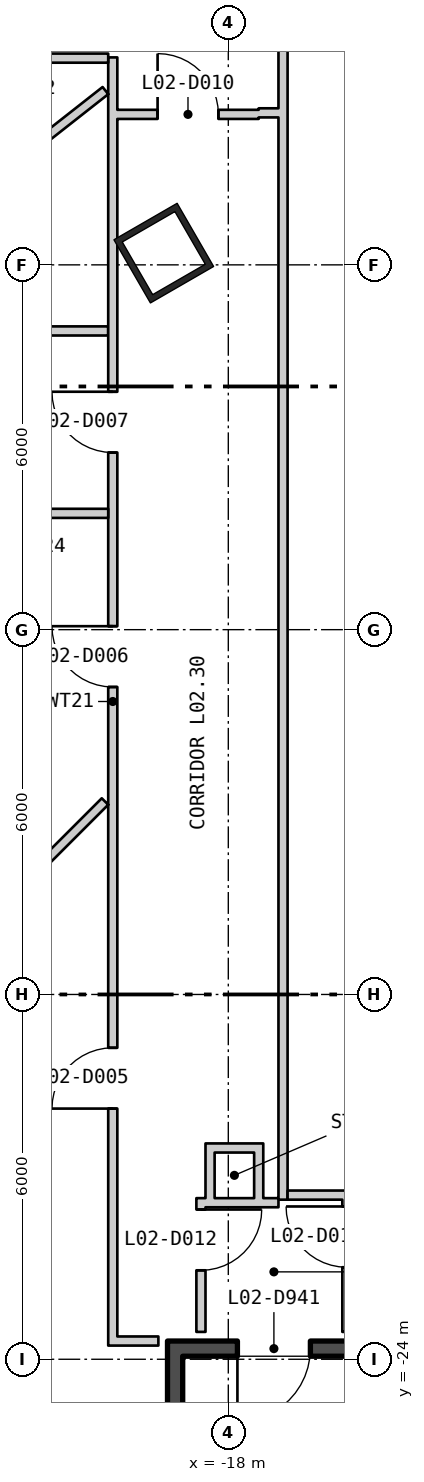
"""IFC4 building model, lengths in metres.
Left out: names, types, materials, properties, quantities, classifications, styles, units other than length and angle.
Written with IfcOpenShell. Run it as: python <this file> out.ifc"""

import sys

from ifc_helpers import new_model, si_unit, direction, frame, frame_2d, origin, origin_2d, place, context, subcontext, project, spatial, rectangle, hollow_rectangle, extrude, element, fill, save


model = new_model("IFC4")
c1 = context("Model", 3, precision=1e-05, world=origin(), true_north=direction((0.0, 1.0)))
c2 = subcontext(c1, "Body", "Model", "MODEL_VIEW")
j1 = project(units=[si_unit("LENGTHUNIT", "METRE"), si_unit("PLANEANGLEUNIT", "RADIAN")], contexts=[c1])
p1 = place(None, origin())
s1 = spatial("IfcSite", under=j1, at=p1, CompositionType="ELEMENT")
p2 = place(p1, origin())
s2 = spatial("IfcBuilding", under=s1, at=p2, CompositionType="ELEMENT")
p3 = place(p2, frame((0.0, 0.0, 13.5)))
s3 = spatial("IfcBuildingStorey", under=s2, at=p3, CompositionType="ELEMENT", Elevation=13.5)
p4 = place(p3, frame((-19.061, -5.807, 0.0), z_axis=(0.0, 0.0, 1.0), x_axis=(0.5, -0.866025403784, 0.0)))
e1 = element("IfcColumn", 1, at=p4, inside=s3, PredefinedType="COLUMN", context=c2, shape_type="SweptSolid", body=[
    extrude(hollow_rectangle(XDim=1.2, YDim=1.2, WallThickness=0.1, at=origin_2d()), origin(), (0.0, 0.0, 1.0), 5.1),
])
p5 = place(p3, frame((-18.875, -31.25, 0.0), z_axis=(0.0, 0.0, 1.0), x_axis=(0.0, 1.0, 0.0)))
e2 = element("IfcWall", 2, at=p5, inside=s3, PredefinedType="SHEAR", context=c2, shape_type="SweptSolid", body=[
    extrude(rectangle(XDim=7.3, YDim=0.25, at=frame_2d((3.65, 0.0))), origin(), (0.0, 0.0, 1.0), 4.88),
])
p6 = place(p3, frame((-19.0, -23.825, 0.0), z_axis=(0.0, 0.0, 1.0), x_axis=(1.0, 0.0, 0.0)))
e3 = element("IfcWall", 3, at=p6, inside=s3, PredefinedType="SHEAR", context=c2, shape_type="SweptSolid", body=[
    extrude(rectangle(XDim=3.5, YDim=0.25, at=frame_2d((1.75, 0.0))), origin(), (0.0, 0.0, 1.0), 4.88),
])
p7 = place(p6, frame((1.15, 0.0, 0.0)))
e4 = element("IfcOpeningElement", 4, at=p7, cuts=e3, PredefinedType="OPENING", context=c2, shape_type="SweptSolid", body=[
    extrude(rectangle(XDim=1.2, YDim=2.1, at=frame_2d((0.6, 1.05))), frame((0.0, 0.135, 0.0), z_axis=(0.0, -1.0, 0.0), x_axis=(1.0, 0.0, 0.0)), (0.0, 0.0, 1.0), 0.27),
])
p8 = place(p3, frame((-26.75, -2.6, 0.0), z_axis=(0.0, 0.0, 1.0), x_axis=(1.0, 0.0, 0.0)))
e5 = element("IfcWall", 5, at=p8, inside=s3, PredefinedType="PARTITIONING", context=c2, shape_type="SweptSolid", body=[
    extrude(rectangle(XDim=6.775, YDim=0.15, at=frame_2d((3.388, 0.0))), origin(), (0.0, 0.0, 1.0), 4.88),
])
p9 = place(p8, frame((1.616, 0.0, 0.0)))
e6 = element("IfcOpeningElement", 6, at=p9, cuts=e5, PredefinedType="OPENING", context=c2, shape_type="SweptSolid", body=[
    extrude(rectangle(XDim=1.0, YDim=2.1, at=frame_2d((0.5, 1.05))), frame((0.0, 0.085, 0.0), z_axis=(0.0, -1.0, 0.0), x_axis=(1.0, 0.0, 0.0)), (0.0, 0.0, 1.0), 0.17),
])
p10 = place(p8, frame((4.658, 0.0, 0.0)))
e7 = element("IfcOpeningElement", 7, at=p10, cuts=e5, PredefinedType="OPENING", context=c2, shape_type="SweptSolid", body=[
    extrude(rectangle(XDim=1.0, YDim=2.1, at=frame_2d((0.5, 1.05))), frame((0.0, 0.085, 0.0), z_axis=(0.0, -1.0, 0.0), x_axis=(1.0, 0.0, 0.0)), (0.0, 0.0, 1.0), 0.17),
])
p11 = place(p3, frame((-25.027, -19.825, 0.0), z_axis=(0.0, 0.0, 1.0), x_axis=(0.707106781187, 0.707106781187, 0.0)))
e8 = element("IfcWall", 8, at=p11, inside=s3, PredefinedType="PARTITIONING", context=c2, shape_type="SweptSolid", body=[
    extrude(rectangle(XDim=7.07, YDim=0.15, at=frame_2d((3.535, 0.0))), origin(), (0.0, 0.0, 1.0), 4.88),
])
p12 = place(p3, frame((-24.745, -6.846, 0.0), z_axis=(0.0, 0.0, 1.0), x_axis=(0.786295235231, 0.617850955372, 0.0)))
e9 = element("IfcWall", 9, at=p12, inside=s3, PredefinedType="PARTITIONING", context=c2, shape_type="SweptSolid", body=[
    extrude(rectangle(XDim=6.008, YDim=0.15, at=frame_2d((3.004, 0.0))), origin(), (0.0, 0.0, 1.0), 4.88),
])
for number, where, z_axis, x_axis in (
    (10, (-22.825, -10.087, 0.0), (0.0, 0.0, 1.0), (1.0, 0.0, 0.0)),
    (11, (-22.825, -7.087, 0.0), (0.0, 0.0, 1.0), (1.0, 0.0, 0.0)),
):
    element("IfcWall", number, at=place(p3, frame(where, z_axis=z_axis, x_axis=x_axis)), inside=s3, PredefinedType="PARTITIONING", context=c2, shape_type="SweptSolid", body=[
        extrude(rectangle(XDim=2.85, YDim=0.15, at=frame_2d((1.425, 0.0))), origin(), (0.0, 0.0, 1.0), 4.88),
    ])
p13 = place(p3, frame((-19.9, -23.775, 0.0), z_axis=(0.0, 0.0, 1.0), x_axis=(0.0, 1.0, 0.0)))
e12 = element("IfcWall", 12, at=p13, inside=s3, PredefinedType="PARTITIONING", context=c2, shape_type="SweptSolid", body=[
    extrude(rectangle(XDim=21.187, YDim=0.15, at=frame_2d((10.594, 0.0))), origin(), (0.0, 0.0, 1.0), 4.88),
])
p14 = place(p13, frame((3.898, 0.0, 0.0)))
e13 = element("IfcOpeningElement", 13, at=p14, cuts=e12, PredefinedType="OPENING", context=c2, shape_type="SweptSolid", body=[
    extrude(rectangle(XDim=1.0, YDim=2.1, at=frame_2d((0.5, 1.05))), frame((0.0, 0.085, 0.0), z_axis=(0.0, -1.0, 0.0), x_axis=(1.0, 0.0, 0.0)), (0.0, 0.0, 1.0), 0.17),
])
p15 = place(p13, frame((10.832, 0.0, 0.0)))
e14 = element("IfcOpeningElement", 14, at=p15, cuts=e12, PredefinedType="OPENING", context=c2, shape_type="SweptSolid", body=[
    extrude(rectangle(XDim=1.0, YDim=2.1, at=frame_2d((0.5, 1.05))), frame((0.0, 0.085, 0.0), z_axis=(0.0, -1.0, 0.0), x_axis=(1.0, 0.0, 0.0)), (0.0, 0.0, 1.0), 0.17),
])
p16 = place(p13, frame((14.688, 0.0, 0.0)))
e15 = element("IfcOpeningElement", 15, at=p16, cuts=e12, PredefinedType="OPENING", context=c2, shape_type="SweptSolid", body=[
    extrude(rectangle(XDim=1.0, YDim=2.1, at=frame_2d((0.5, 1.05))), frame((0.0, 0.085, 0.0), z_axis=(0.0, -1.0, 0.0), x_axis=(1.0, 0.0, 0.0)), (0.0, 0.0, 1.0), 0.17),
])
p17 = place(p3, frame((-19.825, -23.7, 0.0), z_axis=(0.0, 0.0, 1.0), x_axis=(1.0, 0.0, 0.0)))
e16 = element("IfcWall", 16, at=p17, inside=s3, PredefinedType="PARTITIONING", context=c2, shape_type="SweptSolid", body=[
    extrude(rectangle(XDim=0.675, YDim=0.15, at=frame_2d((0.338, 0.0))), origin(), (0.0, 0.0, 1.0), 4.88),
])
p18 = place(p3, frame((-19.825, -3.525, 0.0), z_axis=(0.0, 0.0, 1.0), x_axis=(1.0, 0.0, 0.0)))
e17 = element("IfcWall", 17, at=p18, inside=s3, PredefinedType="PARTITIONING", context=c2, shape_type="SweptSolid", body=[
    extrude(rectangle(XDim=2.325, YDim=0.15, at=frame_2d((1.163, 0.0))), origin(), (0.0, 0.0, 1.0), 4.88),
])
p19 = place(p18, frame((0.662, 0.0, 0.0)))
e18 = element("IfcOpeningElement", 18, at=p19, cuts=e17, PredefinedType="OPENING", context=c2, shape_type="SweptSolid", body=[
    extrude(rectangle(XDim=1.0, YDim=2.1, at=frame_2d((0.5, 1.05))), frame((0.0, 0.085, 0.0), z_axis=(0.0, -1.0, 0.0), x_axis=(1.0, 0.0, 0.0)), (0.0, 0.0, 1.0), 0.17),
])
p20 = place(p3, frame((-18.45, -23.55, 0.0), z_axis=(0.0, 0.0, 1.0), x_axis=(0.0, 1.0, 0.0)))
e19 = element("IfcWall", 19, at=p20, inside=s3, PredefinedType="PARTITIONING", context=c2, shape_type="SweptSolid", body=[
    extrude(rectangle(XDim=2.2, YDim=0.15, at=frame_2d((1.1, 0.0))), origin(), (0.0, 0.0, 1.0), 4.88),
])
p21 = place(p20, frame((1.013, 0.0, 0.0)))
e20 = element("IfcOpeningElement", 20, at=p21, cuts=e19, PredefinedType="OPENING", context=c2, shape_type="SweptSolid", body=[
    extrude(rectangle(XDim=1.0, YDim=2.1, at=frame_2d((0.5, 1.05))), frame((0.0, 0.085, 0.0), z_axis=(0.0, -1.0, 0.0), x_axis=(1.0, 0.0, 0.0)), (0.0, 0.0, 1.0), 0.17),
])
p22 = place(p3, frame((-18.3, -21.5, 0.0), z_axis=(0.0, 0.0, 1.0), x_axis=(0.0, 1.0, 0.0)))
e21 = element("IfcWall", 21, at=p22, inside=s3, PredefinedType="PARTITIONING", context=c2, shape_type="SweptSolid", body=[
    extrude(rectangle(XDim=1.05, YDim=0.15, at=frame_2d((0.525, 0.0))), origin(), (0.0, 0.0, 1.0), 4.88),
])
for number, where, z_axis, x_axis in (
    (22, (-18.225, -21.425, 0.0), (0.0, 0.0, 1.0), (1.0, 0.0, 0.0)),
    (23, (-18.225, -20.525, 0.0), (0.0, 0.0, 1.0), (1.0, 0.0, 0.0)),
):
    element("IfcWall", number, at=place(p3, frame(where, z_axis=z_axis, x_axis=x_axis)), inside=s3, PredefinedType="PARTITIONING", context=c2, shape_type="SweptSolid", body=[
        extrude(rectangle(XDim=0.65, YDim=0.15, at=frame_2d((0.325, 0.0))), origin(), (0.0, 0.0, 1.0), 4.88),
    ])
p23 = place(p3, frame((-17.5, -21.5, 0.0), z_axis=(0.0, 0.0, 1.0), x_axis=(0.0, 1.0, 0.0)))
e24 = element("IfcWall", 24, at=p23, inside=s3, PredefinedType="PARTITIONING", context=c2, shape_type="SweptSolid", body=[
    extrude(rectangle(XDim=1.05, YDim=0.15, at=frame_2d((0.525, 0.0))), origin(), (0.0, 0.0, 1.0), 4.88),
])
p24 = place(p3, frame((-17.5, -3.5, 0.0), z_axis=(0.0, 0.0, 1.0), x_axis=(1.0, 0.0, 0.0)))
e25 = element("IfcWall", 25, at=p24, inside=s3, PredefinedType="PARTITIONING", context=c2, shape_type="SweptSolid", body=[
    extrude(rectangle(XDim=0.325, YDim=0.15, at=frame_2d((0.163, 0.0))), origin(), (0.0, 0.0, 1.0), 4.88),
])
p25 = place(p3, frame((-17.425, -21.425, 0.0), z_axis=(0.0, 0.0, 1.0), x_axis=(1.0, 0.0, 0.0)))
e26 = element("IfcWall", 26, at=p25, inside=s3, PredefinedType="PARTITIONING", context=c2, shape_type="SweptSolid", body=[
    extrude(rectangle(XDim=0.25, YDim=0.15, at=frame_2d((0.125, 0.0))), origin(), (0.0, 0.0, 1.0), 4.88),
])
p26 = place(p3, frame((-17.1, -21.375, 0.0), z_axis=(0.0, 0.0, 1.0), x_axis=(0.0, 1.0, 0.0)))
e27 = element("IfcWall", 27, at=p26, inside=s3, PredefinedType="PARTITIONING", context=c2, shape_type="SweptSolid", body=[
    extrude(rectangle(XDim=19.05, YDim=0.15, at=frame_2d((9.525, 0.0))), origin(), (0.0, 0.0, 1.0), 4.88),
])
p27 = place(p3, frame((-17.025, -21.3, 0.0), z_axis=(0.0, 0.0, 1.0), x_axis=(1.0, 0.0, 0.0)))
e28 = element("IfcWall", 28, at=p27, inside=s3, PredefinedType="PARTITIONING", context=c2, shape_type="SweptSolid", body=[
    extrude(rectangle(XDim=10.654, YDim=0.15, at=frame_2d((5.327, 0.0))), origin(), (0.0, 0.0, 1.0), 4.88),
])
p28 = place(p3, frame((-16.05, -23.55, 0.0), z_axis=(0.0, 0.0, 1.0), x_axis=(0.0, 1.0, 0.0)))
e29 = element("IfcWall", 29, at=p28, inside=s3, PredefinedType="PARTITIONING", context=c2, shape_type="SweptSolid", body=[
    extrude(rectangle(XDim=2.175, YDim=0.15, at=frame_2d((1.087, 0.0))), origin(), (0.0, 0.0, 1.0), 4.88),
])
p29 = place(p28, frame((1.063, 0.0, 0.0)))
e30 = element("IfcOpeningElement", 30, at=p29, cuts=e29, PredefinedType="OPENING", context=c2, shape_type="SweptSolid", body=[
    extrude(rectangle(XDim=1.0, YDim=2.1, at=frame_2d((0.5, 1.05))), frame((0.0, 0.085, 0.0), z_axis=(0.0, -1.0, 0.0), x_axis=(1.0, 0.0, 0.0)), (0.0, 0.0, 1.0), 0.17),
])
p30 = place(p7, origin())
e31 = element("IfcDoor", 31, at=p30, inside=s3, OperationType="SINGLE_SWING_LEFT", PredefinedType="DOOR", context=c2, shape_type="SweptSolid", body=[
    extrude(rectangle(XDim=1.2, YDim=2.1, at=frame_2d((0.6, 1.05))), frame((0.0, 0.025, 0.0), z_axis=(0.0, -1.0, 0.0), x_axis=(1.0, 0.0, 0.0)), (0.0, 0.0, 1.0), 0.05),
])
fill(e4, e31)
p31 = place(p14, origin())
e32 = element("IfcDoor", 32, at=p31, inside=s3, OperationType="SINGLE_SWING_RIGHT", PredefinedType="DOOR", context=c2, shape_type="SweptSolid", body=[
    extrude(rectangle(XDim=1.0, YDim=2.1, at=frame_2d((0.5, 1.05))), frame((0.0, 0.025, 0.0), z_axis=(0.0, -1.0, 0.0), x_axis=(1.0, 0.0, 0.0)), (0.0, 0.0, 1.0), 0.05),
])
fill(e13, e32)
p32 = place(p15, origin())
e33 = element("IfcDoor", 33, at=p32, inside=s3, OperationType="SINGLE_SWING_LEFT", PredefinedType="DOOR", context=c2, shape_type="SweptSolid", body=[
    extrude(rectangle(XDim=1.0, YDim=2.1, at=frame_2d((0.5, 1.05))), frame((0.0, 0.025, 0.0), z_axis=(0.0, -1.0, 0.0), x_axis=(1.0, 0.0, 0.0)), (0.0, 0.0, 1.0), 0.05),
])
fill(e14, e33)
p33 = place(p16, origin())
e34 = element("IfcDoor", 34, at=p33, inside=s3, OperationType="SINGLE_SWING_LEFT", PredefinedType="DOOR", context=c2, shape_type="SweptSolid", body=[
    extrude(rectangle(XDim=1.0, YDim=2.1, at=frame_2d((0.5, 1.05))), frame((0.0, 0.025, 0.0), z_axis=(0.0, -1.0, 0.0), x_axis=(1.0, 0.0, 0.0)), (0.0, 0.0, 1.0), 0.05),
])
fill(e15, e34)
p34 = place(p19, origin())
e35 = element("IfcDoor", 35, at=p34, inside=s3, OperationType="SINGLE_SWING_RIGHT", PredefinedType="DOOR", context=c2, shape_type="SweptSolid", body=[
    extrude(rectangle(XDim=1.0, YDim=2.1, at=frame_2d((0.5, 1.05))), frame((0.0, 0.025, 0.0), z_axis=(0.0, -1.0, 0.0), x_axis=(1.0, 0.0, 0.0)), (0.0, 0.0, 1.0), 0.05),
])
fill(e18, e35)
p35 = place(p21, origin())
e36 = element("IfcDoor", 36, at=p35, inside=s3, OperationType="SINGLE_SWING_RIGHT", PredefinedType="DOOR", context=c2, shape_type="SweptSolid", body=[
    extrude(rectangle(XDim=1.0, YDim=2.1, at=frame_2d((0.5, 1.05))), frame((0.0, 0.025, 0.0), z_axis=(0.0, -1.0, 0.0), x_axis=(1.0, 0.0, 0.0)), (0.0, 0.0, 1.0), 0.05),
])
fill(e20, e36)
save(model, sys.argv[1])
